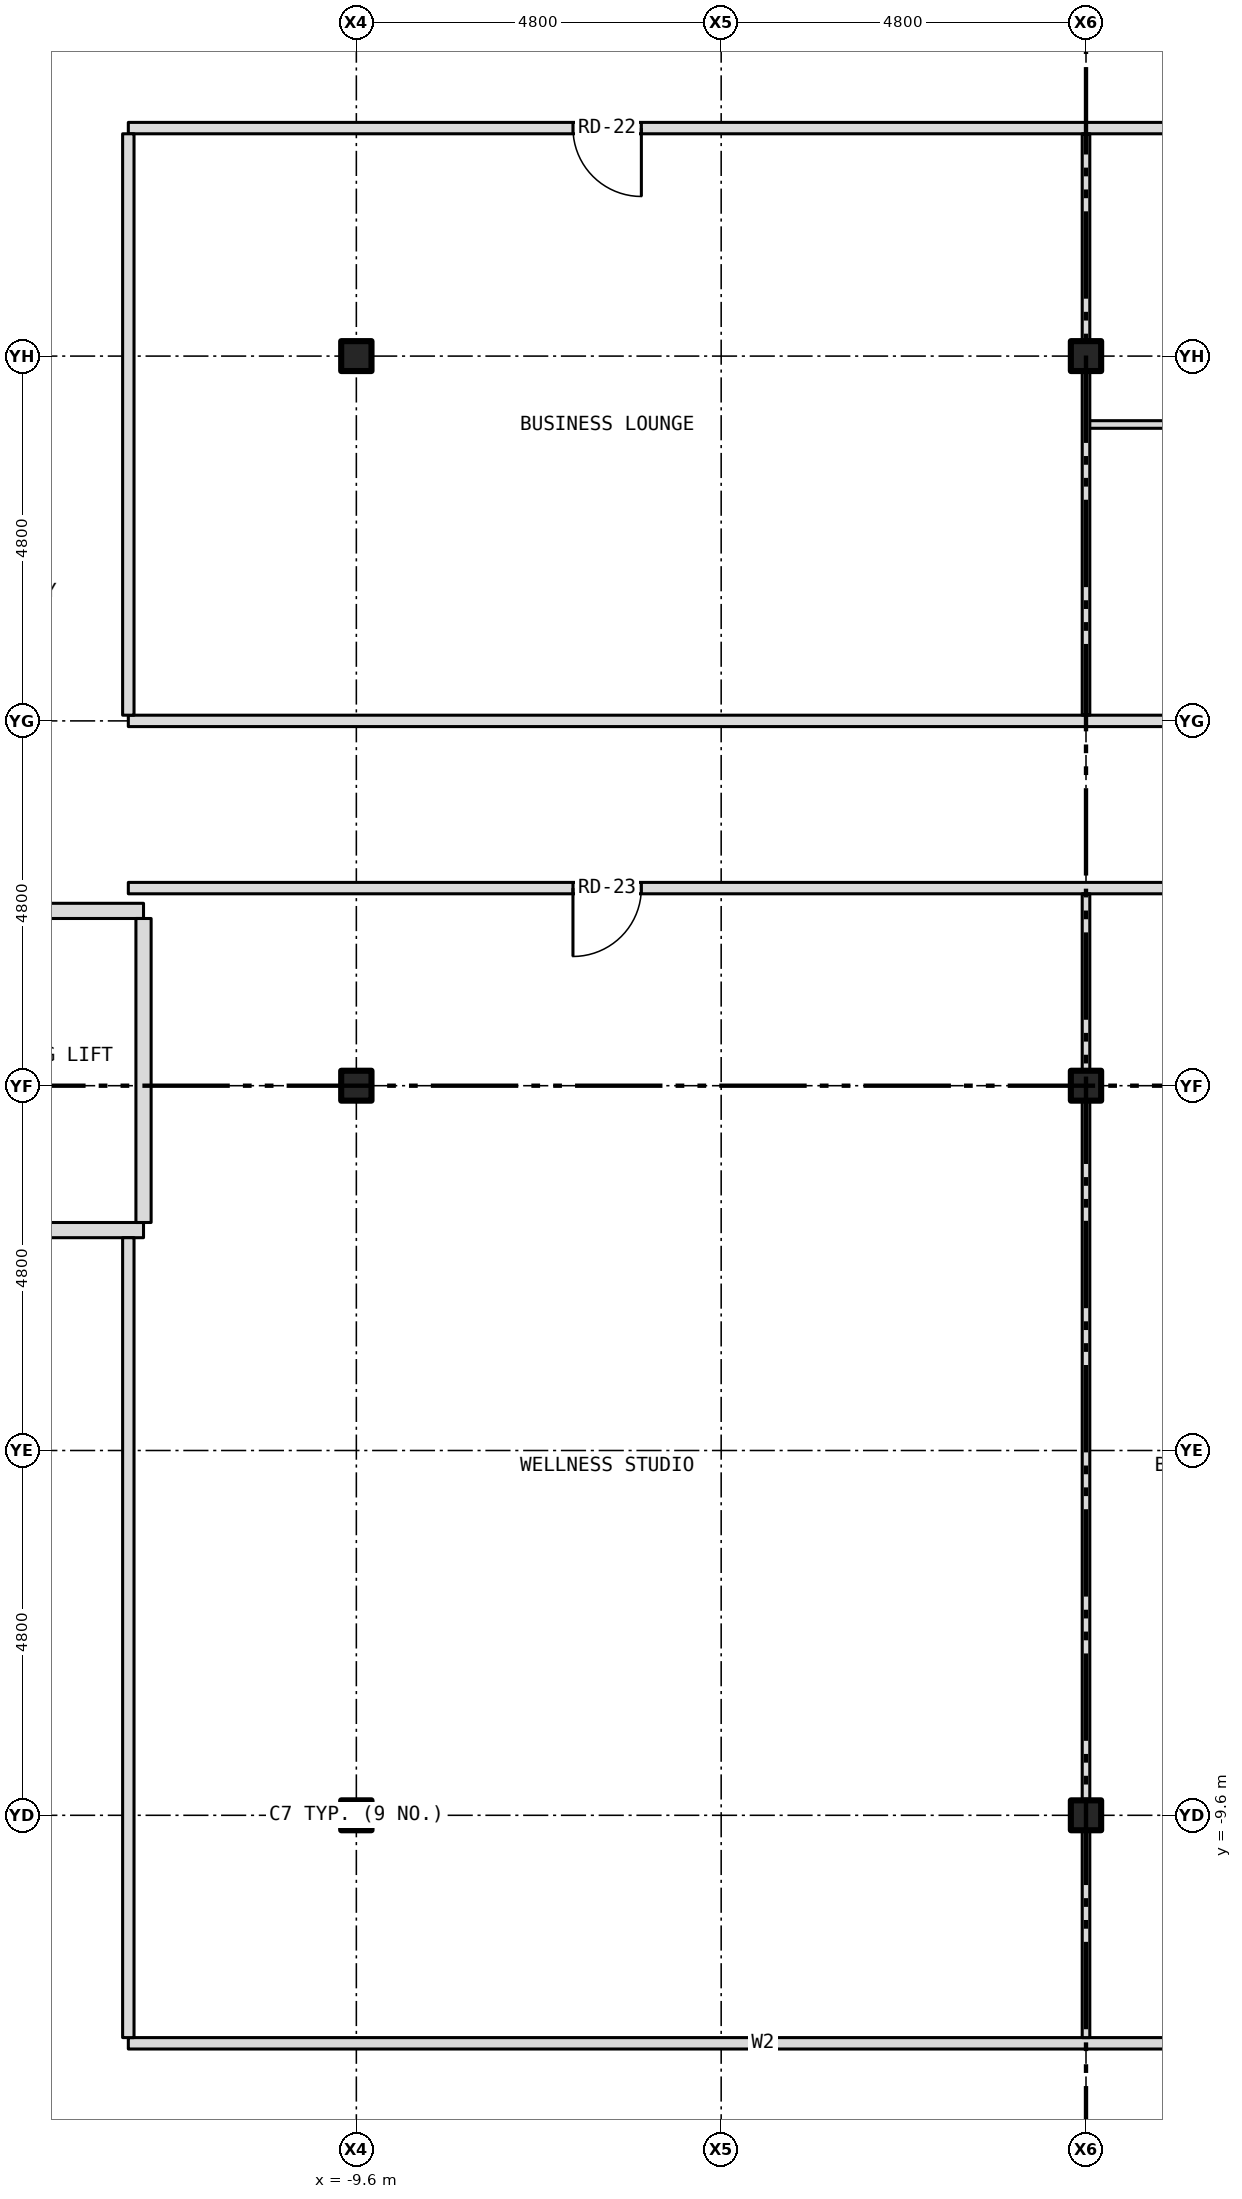
"""IFC4 building model, lengths in metres.
Left out: names, types, materials, properties, quantities, classifications, styles, units other than length and angle.
Written with IfcOpenShell. Run it as: python <this file> out.ifc"""

import sys

from ifc_helpers import new_model, si_unit, direction, frame, frame_2d, origin, origin_2d, place, context, subcontext, project, spatial, rectangle, i_section, extrude, element, fill, save


model = new_model("IFC4")
c1 = context("Model", 3, precision=1e-05, world=origin(), true_north=direction((0.0, 1.0)))
c2 = subcontext(c1, "Body", "Model", "MODEL_VIEW")
j1 = project(units=[si_unit("LENGTHUNIT", "METRE"), si_unit("PLANEANGLEUNIT", "RADIAN")], contexts=[c1])
p1 = place(None, origin())
s1 = spatial("IfcSite", under=j1, at=p1, CompositionType="ELEMENT")
p2 = place(p1, origin())
s2 = spatial("IfcBuilding", under=s1, at=p2, CompositionType="ELEMENT")
p3 = place(p2, frame((0.0, 0.0, 106.5)))
s3 = spatial("IfcBuildingStorey", under=s2, at=p3, CompositionType="ELEMENT", Elevation=106.5)
for number, where, z_axis, x_axis in (
    (1, (-9.6, -9.6, -0.15), (0.0, 0.0, 1.0), (1.0, 0.0, 0.0)),
    (2, (-9.6, 0.0, -0.15), (0.0, 0.0, 1.0), (1.0, 0.0, 0.0)),
    (3, (-9.6, 9.6, -0.15), (0.0, 0.0, 1.0), (1.0, 0.0, 0.0)),
    (4, (0.0, -9.6, -0.15), (0.0, 0.0, 1.0), (1.0, 0.0, 0.0)),
    (5, (0.0, 0.0, -0.15), (0.0, 0.0, 1.0), (1.0, 0.0, 0.0)),
    (6, (0.0, 9.6, -0.15), (0.0, 0.0, 1.0), (1.0, 0.0, 0.0)),
):
    element("IfcColumn", number, at=place(p3, frame(where, z_axis=z_axis, x_axis=x_axis)), inside=s3, PredefinedType="COLUMN", context=c2, shape_type="SweptSolid", body=[
        extrude(i_section(OverallWidth=0.399, OverallDepth=0.394, WebThickness=0.023, FlangeThickness=0.037, at=origin_2d()), origin(), (0.0, 0.0, 1.0), 3.5),
    ])
p4 = place(p3, frame((-12.6, -12.6, 0.0), z_axis=(0.0, 0.0, 1.0), x_axis=(1.0, 0.0, 0.0)))
e7 = element("IfcWall", 7, at=p4, inside=s3, PredefinedType="PARTITIONING", context=c2, shape_type="SweptSolid", body=[
    extrude(rectangle(XDim=16.7, YDim=0.15, at=frame_2d((8.35, 0.0))), origin(), (0.0, 0.0, 1.0), 3.35),
])
p5 = place(p3, frame((-15.68, -1.9, 0.0), z_axis=(0.0, 0.0, 1.0), x_axis=(1.0, 0.0, 0.0)))
e8 = element("IfcWall", 8, at=p5, inside=s3, PredefinedType="PARTITIONING", context=c2, shape_type="SweptSolid", body=[
    extrude(rectangle(XDim=3.28, YDim=0.2, at=frame_2d((1.64, 0.0))), origin(), (0.0, 0.0, 1.0), 3.35),
])
p6 = place(p5, frame((0.94, 0.0, 0.0)))
e9 = element("IfcOpeningElement", 9, at=p6, cuts=e8, PredefinedType="OPENING", context=c2, shape_type="SweptSolid", body=[
    extrude(rectangle(XDim=1.1, YDim=2.1, at=frame_2d((0.55, 1.05))), frame((0.0, 0.112, 0.0), z_axis=(0.0, -1.0, 0.0), x_axis=(1.0, 0.0, 0.0)), (0.0, 0.0, 1.0), 0.224),
])
p7 = place(p3, frame((-15.68, 2.3, 0.0), z_axis=(0.0, 0.0, 1.0), x_axis=(1.0, 0.0, 0.0)))
e10 = element("IfcWall", 10, at=p7, inside=s3, PredefinedType="PARTITIONING", context=c2, shape_type="SweptSolid", body=[
    extrude(rectangle(XDim=3.28, YDim=0.2, at=frame_2d((1.64, 0.0))), origin(), (0.0, 0.0, 1.0), 3.35),
])
p8 = place(p7, frame((0.84, 0.0, 0.0)))
e11 = element("IfcOpeningElement", 11, at=p8, cuts=e10, PredefinedType="OPENING", context=c2, shape_type="SweptSolid", body=[
    extrude(rectangle(XDim=1.1, YDim=2.1, at=frame_2d((0.55, 1.05))), frame((0.0, 0.112, 0.0), z_axis=(0.0, -1.0, 0.0), x_axis=(1.0, 0.0, 0.0)), (0.0, 0.0, 1.0), 0.224),
])
p9 = place(p3, frame((-12.6, 2.6, 0.0), z_axis=(0.0, 0.0, 1.0), x_axis=(1.0, 0.0, 0.0)))
e12 = element("IfcWall", 12, at=p9, inside=s3, PredefinedType="PARTITIONING", context=c2, shape_type="SweptSolid", body=[
    extrude(rectangle(XDim=16.7, YDim=0.15, at=frame_2d((8.35, 0.0))), origin(), (0.0, 0.0, 1.0), 3.35),
])
p10 = place(p9, frame((5.85, 0.0, 0.0)))
e13 = element("IfcOpeningElement", 13, at=p10, cuts=e12, PredefinedType="OPENING", context=c2, shape_type="SweptSolid", body=[
    extrude(rectangle(XDim=0.9, YDim=2.1, at=frame_2d((0.45, 1.05))), frame((0.0, 0.087, 0.0), z_axis=(0.0, -1.0, 0.0), x_axis=(1.0, 0.0, 0.0)), (0.0, 0.0, 1.0), 0.174),
])
p11 = place(p3, frame((-12.6, 4.8, 0.0), z_axis=(0.0, 0.0, 1.0), x_axis=(1.0, 0.0, 0.0)))
e14 = element("IfcWall", 14, at=p11, inside=s3, PredefinedType="PARTITIONING", context=c2, shape_type="SweptSolid", body=[
    extrude(rectangle(XDim=16.7, YDim=0.15, at=frame_2d((8.35, 0.0))), origin(), (0.0, 0.0, 1.0), 3.35),
])
p12 = place(p11, frame((14.2, 0.0, 0.0)))
e15 = element("IfcOpeningElement", 15, at=p12, cuts=e14, PredefinedType="OPENING", context=c2, shape_type="SweptSolid", body=[
    extrude(rectangle(XDim=0.9, YDim=2.1, at=frame_2d((0.45, 1.05))), frame((0.0, 0.087, 0.0), z_axis=(0.0, -1.0, 0.0), x_axis=(1.0, 0.0, 0.0)), (0.0, 0.0, 1.0), 0.174),
])
p13 = place(p3, frame((0.0, 8.7, 0.0), z_axis=(0.0, 0.0, 1.0), x_axis=(1.0, 0.0, 0.0)))
e16 = element("IfcWall", 16, at=p13, inside=s3, PredefinedType="PARTITIONING", context=c2, shape_type="SweptSolid", body=[
    extrude(rectangle(XDim=4.1, YDim=0.1, at=frame_2d((2.05, 0.0))), origin(), (0.0, 0.0, 1.0), 3.35),
])
p14 = place(p3, frame((-12.6, 12.6, 0.0), z_axis=(0.0, 0.0, 1.0), x_axis=(1.0, 0.0, 0.0)))
e17 = element("IfcWall", 17, at=p14, inside=s3, PredefinedType="PARTITIONING", context=c2, shape_type="SweptSolid", body=[
    extrude(rectangle(XDim=16.7, YDim=0.15, at=frame_2d((8.35, 0.0))), origin(), (0.0, 0.0, 1.0), 3.35),
])
p15 = place(p14, frame((14.2, 0.0, 0.0)))
e18 = element("IfcOpeningElement", 18, at=p15, cuts=e17, PredefinedType="OPENING", context=c2, shape_type="SweptSolid", body=[
    extrude(rectangle(XDim=0.9, YDim=2.1, at=frame_2d((0.45, 1.05))), frame((0.0, 0.087, 0.0), z_axis=(0.0, -1.0, 0.0), x_axis=(1.0, 0.0, 0.0)), (0.0, 0.0, 1.0), 0.174),
])
p16 = place(p14, frame((5.85, 0.0, 0.0)))
e19 = element("IfcOpeningElement", 19, at=p16, cuts=e17, PredefinedType="OPENING", context=c2, shape_type="SweptSolid", body=[
    extrude(rectangle(XDim=0.9, YDim=2.1, at=frame_2d((0.45, 1.05))), frame((0.0, 0.087, 0.0), z_axis=(0.0, -1.0, 0.0), x_axis=(1.0, 0.0, 0.0)), (0.0, 0.0, 1.0), 0.174),
])
p17 = place(p3, frame((-12.6, -12.525, 0.0), z_axis=(0.0, 0.0, 1.0), x_axis=(0.0, 1.0, 0.0)))
e20 = element("IfcWall", 20, at=p17, inside=s3, PredefinedType="PARTITIONING", context=c2, shape_type="SweptSolid", body=[
    extrude(rectangle(XDim=10.525, YDim=0.15, at=frame_2d((5.262, 0.0))), origin(), (0.0, 0.0, 1.0), 3.35),
])
p18 = place(p3, frame((-12.6, 4.875, 0.0), z_axis=(0.0, 0.0, 1.0), x_axis=(0.0, 1.0, 0.0)))
e21 = element("IfcWall", 21, at=p18, inside=s3, PredefinedType="PARTITIONING", context=c2, shape_type="SweptSolid", body=[
    extrude(rectangle(XDim=7.65, YDim=0.15, at=frame_2d((3.825, 0.0))), origin(), (0.0, 0.0, 1.0), 3.35),
])
p19 = place(p3, frame((-12.4, -1.8, 0.0), z_axis=(0.0, 0.0, 1.0), x_axis=(0.0, 1.0, 0.0)))
e22 = element("IfcWall", 22, at=p19, inside=s3, PredefinedType="PARTITIONING", context=c2, shape_type="SweptSolid", body=[
    extrude(rectangle(XDim=4.0, YDim=0.2, at=frame_2d((2.0, 0.0))), origin(), (0.0, 0.0, 1.0), 3.35),
])
p20 = place(p3, frame((0.0, -12.525, 0.0), z_axis=(0.0, 0.0, 1.0), x_axis=(0.0, 1.0, 0.0)))
e23 = element("IfcWall", 23, at=p20, inside=s3, PredefinedType="PARTITIONING", context=c2, shape_type="SweptSolid", body=[
    extrude(rectangle(XDim=2.726, YDim=0.1, at=frame_2d((1.363, 0.0))), origin(), (0.0, 0.0, 1.0), 2.728),
])
p21 = place(p3, frame((0.0, -9.799, 0.0), z_axis=(0.0, 0.0, 1.0), x_axis=(0.0, 1.0, 0.0)))
e24 = element("IfcWall", 24, at=p21, inside=s3, PredefinedType="PARTITIONING", context=c2, shape_type="SweptSolid", body=[
    extrude(rectangle(XDim=0.398, YDim=0.1, at=frame_2d((0.199, 0.0))), origin(), (0.0, 0.0, 1.0), 3.35),
])
p22 = place(p3, frame((0.0, -9.401, 0.0), z_axis=(0.0, 0.0, 1.0), x_axis=(0.0, 1.0, 0.0)))
e25 = element("IfcWall", 25, at=p22, inside=s3, PredefinedType="PARTITIONING", context=c2, shape_type="SweptSolid", body=[
    extrude(rectangle(XDim=9.202, YDim=0.1, at=frame_2d((4.601, 0.0))), origin(), (0.0, 0.0, 1.0), 2.728),
])
p23 = place(p3, frame((0.0, -0.199, 0.0), z_axis=(0.0, 0.0, 1.0), x_axis=(0.0, 1.0, 0.0)))
e26 = element("IfcWall", 26, at=p23, inside=s3, PredefinedType="PARTITIONING", context=c2, shape_type="SweptSolid", body=[
    extrude(rectangle(XDim=0.398, YDim=0.1, at=frame_2d((0.199, 0.0))), origin(), (0.0, 0.0, 1.0), 3.35),
])
p24 = place(p3, frame((0.0, 0.199, 0.0), z_axis=(0.0, 0.0, 1.0), x_axis=(0.0, 1.0, 0.0)))
e27 = element("IfcWall", 27, at=p24, inside=s3, PredefinedType="PARTITIONING", context=c2, shape_type="SweptSolid", body=[
    extrude(rectangle(XDim=2.326, YDim=0.1, at=frame_2d((1.163, 0.0))), origin(), (0.0, 0.0, 1.0), 2.728),
])
p25 = place(p3, frame((0.0, 4.875, 0.0), z_axis=(0.0, 0.0, 1.0), x_axis=(0.0, 1.0, 0.0)))
e28 = element("IfcWall", 28, at=p25, inside=s3, PredefinedType="PARTITIONING", context=c2, shape_type="SweptSolid", body=[
    extrude(rectangle(XDim=4.526, YDim=0.1, at=frame_2d((2.263, 0.0))), origin(), (0.0, 0.0, 1.0), 2.728),
])
p26 = place(p3, frame((0.0, 9.401, 0.0), z_axis=(0.0, 0.0, 1.0), x_axis=(0.0, 1.0, 0.0)))
e29 = element("IfcWall", 29, at=p26, inside=s3, PredefinedType="PARTITIONING", context=c2, shape_type="SweptSolid", body=[
    extrude(rectangle(XDim=0.398, YDim=0.1, at=frame_2d((0.199, 0.0))), origin(), (0.0, 0.0, 1.0), 3.35),
])
p27 = place(p3, frame((0.0, 9.799, 0.0), z_axis=(0.0, 0.0, 1.0), x_axis=(0.0, 1.0, 0.0)))
e30 = element("IfcWall", 30, at=p27, inside=s3, PredefinedType="PARTITIONING", context=c2, shape_type="SweptSolid", body=[
    extrude(rectangle(XDim=2.726, YDim=0.1, at=frame_2d((1.363, 0.0))), origin(), (0.0, 0.0, 1.0), 2.728),
])
p28 = place(p16, origin())
e31 = element("IfcDoor", 31, at=p28, inside=s3, OperationType="SINGLE_SWING_RIGHT", PredefinedType="DOOR", context=c2, shape_type="SweptSolid", body=[
    extrude(rectangle(XDim=0.9, YDim=2.1, at=frame_2d((0.45, 1.05))), frame((0.0, 0.025, 0.0), z_axis=(0.0, -1.0, 0.0), x_axis=(1.0, 0.0, 0.0)), (0.0, 0.0, 1.0), 0.05),
])
fill(e19, e31)
p29 = place(p10, origin())
e32 = element("IfcDoor", 32, at=p29, inside=s3, OperationType="SINGLE_SWING_LEFT", PredefinedType="DOOR", context=c2, shape_type="SweptSolid", body=[
    extrude(rectangle(XDim=0.9, YDim=2.1, at=frame_2d((0.45, 1.05))), frame((0.0, 0.025, 0.0), z_axis=(0.0, -1.0, 0.0), x_axis=(1.0, 0.0, 0.0)), (0.0, 0.0, 1.0), 0.05),
])
fill(e13, e32)
save(model, sys.argv[1])
